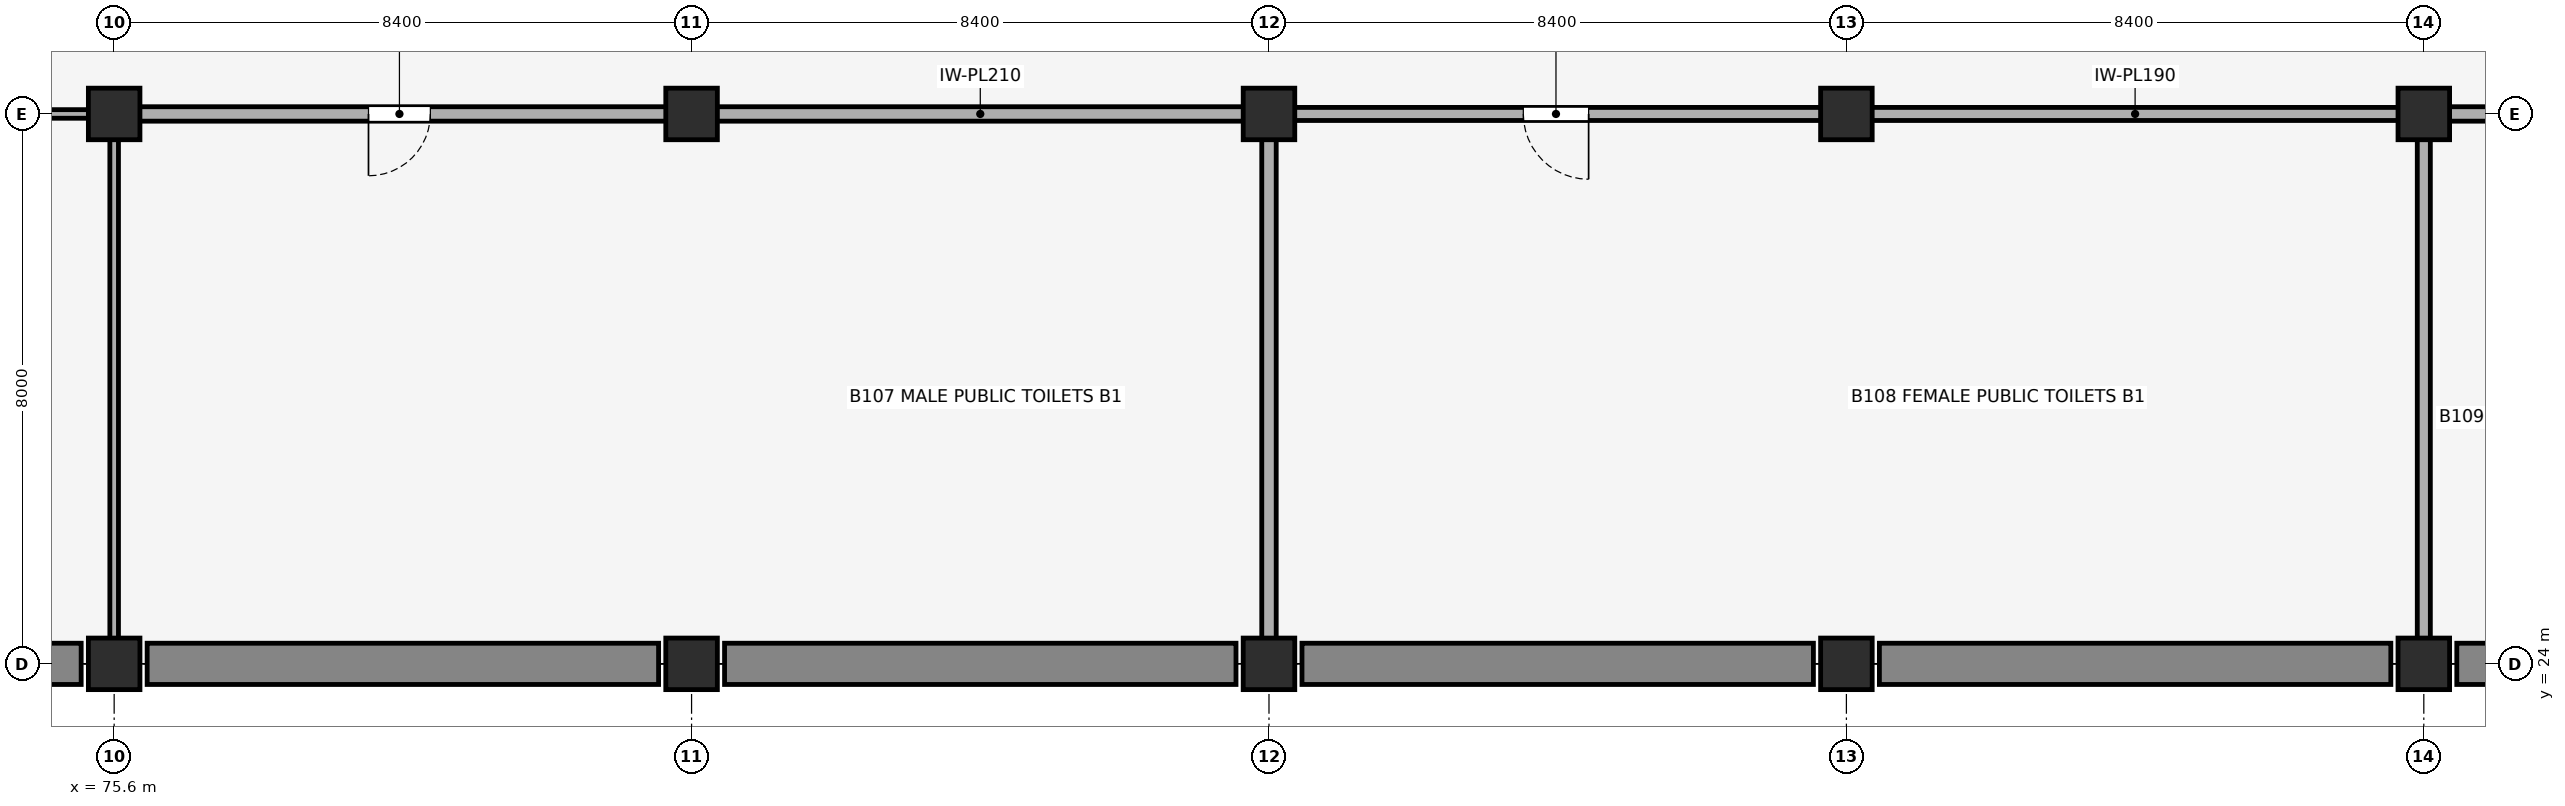
"""IFC4 building model, lengths in metres.
Left out: names, types, materials, properties, quantities, classifications, styles, units other than length and angle.
Written with IfcOpenShell. Run it as: python <this file> out.ifc"""

import sys

from ifc_helpers import new_model, si_unit, direction, frame, frame_2d, origin, origin_2d, place, context, subcontext, project, spatial, rectangle, extrude, element, fill, save


model = new_model("IFC4")
c1 = context("Model", 3, precision=1e-05, world=origin(), true_north=direction((0.0, 1.0)))
c2 = subcontext(c1, "Body", "Model", "MODEL_VIEW")
j1 = project(units=[si_unit("LENGTHUNIT", "METRE"), si_unit("PLANEANGLEUNIT", "RADIAN")], contexts=[c1])
p1 = place(None, origin())
s1 = spatial("IfcSite", under=j1, at=p1, CompositionType="ELEMENT")
p2 = place(p1, origin())
s2 = spatial("IfcBuilding", under=s1, at=p2, CompositionType="ELEMENT")
p3 = place(p2, frame((0.0, 0.0, -5.44)))
s3 = spatial("IfcBuildingStorey", under=s2, at=p3, CompositionType="ELEMENT", Elevation=-5.44)
p4 = place(p3, frame((67.68, 24.0, 0.0), z_axis=(0.0, 0.0, 1.0), x_axis=(1.0, 0.0, 0.0)))
e1 = element("IfcWall", 1, at=p4, inside=s3, PredefinedType="SOLIDWALL", context=c2, shape_type="SweptSolid", body=[
    extrude(rectangle(XDim=7.44, YDim=0.6, at=frame_2d((3.72, 0.0))), origin(), (0.0, 0.0, 1.0), 5.02),
])
for number, where, z_axis, x_axis in (
    (2, (76.08, 24.0, 0.0), (0.0, 0.0, 1.0), (1.0, 0.0, 0.0)),
    (3, (84.48, 24.0, 0.0), (0.0, 0.0, 1.0), (1.0, 0.0, 0.0)),
):
    element("IfcWall", number, at=place(p3, frame(where, z_axis=z_axis, x_axis=x_axis)), inside=s3, PredefinedType="SOLIDWALL", context=c2, shape_type="SweptSolid", body=[
        extrude(rectangle(XDim=7.44, YDim=0.6, at=frame_2d((3.72, 0.0))), origin(), (0.0, 0.0, 1.0), 5.02),
    ])
p5 = place(p3, frame((92.88, 24.0, 0.0), z_axis=(0.0, 0.0, 1.0), x_axis=(1.0, 0.0, 0.0)))
e4 = element("IfcWall", 4, at=p5, inside=s3, PredefinedType="SOLIDWALL", context=c2, shape_type="SweptSolid", body=[
    extrude(rectangle(XDim=7.44, YDim=0.6, at=frame_2d((3.72, 0.0))), origin(), (0.0, 0.0, 1.0), 5.02),
])
p6 = place(p3, frame((101.28, 24.0, 0.0), z_axis=(0.0, 0.0, 1.0), x_axis=(1.0, 0.0, 0.0)))
e5 = element("IfcWall", 5, at=p6, inside=s3, PredefinedType="SOLIDWALL", context=c2, shape_type="SweptSolid", body=[
    extrude(rectangle(XDim=7.44, YDim=0.6, at=frame_2d((3.72, 0.0))), origin(), (0.0, 0.0, 1.0), 5.02),
])
p7 = place(p3, frame((109.68, 24.0, 0.0), z_axis=(0.0, 0.0, 1.0), x_axis=(1.0, 0.0, 0.0)))
e6 = element("IfcWall", 6, at=p7, inside=s3, PredefinedType="SOLIDWALL", context=c2, shape_type="SweptSolid", body=[
    extrude(rectangle(XDim=7.44, YDim=0.6, at=frame_2d((3.72, 0.0))), origin(), (0.0, 0.0, 1.0), 5.02),
])
for number, where, z_axis, x_axis in (
    (7, (75.6, 24.0, 0.0), (0.0, 0.0, 1.0), (1.0, 0.0, 0.0)),
    (8, (75.6, 32.0, 0.0), (0.0, 0.0, 1.0), (1.0, 0.0, 0.0)),
    (9, (84.0, 24.0, 0.0), (0.0, 0.0, 1.0), (1.0, 0.0, 0.0)),
    (10, (84.0, 32.0, 0.0), (0.0, 0.0, 1.0), (1.0, 0.0, 0.0)),
    (11, (92.4, 24.0, 0.0), (0.0, 0.0, 1.0), (1.0, 0.0, 0.0)),
    (12, (92.4, 32.0, 0.0), (0.0, 0.0, 1.0), (1.0, 0.0, 0.0)),
    (13, (100.8, 24.0, 0.0), (0.0, 0.0, 1.0), (1.0, 0.0, 0.0)),
    (14, (100.8, 32.0, 0.0), (0.0, 0.0, 1.0), (1.0, 0.0, 0.0)),
    (15, (109.2, 24.0, 0.0), (0.0, 0.0, 1.0), (1.0, 0.0, 0.0)),
    (16, (109.2, 32.0, 0.0), (0.0, 0.0, 1.0), (1.0, 0.0, 0.0)),
):
    element("IfcColumn", number, at=place(p3, frame(where, z_axis=z_axis, x_axis=x_axis)), inside=s3, PredefinedType="COLUMN", context=c2, shape_type="SweptSolid", body=[
        extrude(rectangle(XDim=0.75, YDim=0.75, at=origin_2d()), origin(), (0.0, 0.0, 1.0), 5.02),
    ])
p8 = place(p3, frame((75.965, 32.0, 0.0), z_axis=(0.0, 0.0, 1.0), x_axis=(1.0, 0.0, 0.0)))
e17 = element("IfcWall", 17, at=p8, inside=s3, PredefinedType="PLUMBINGWALL", context=c2, shape_type="SweptSolid", body=[
    extrude(rectangle(XDim=7.67, YDim=0.21, at=frame_2d((3.835, 0.0))), origin(), (0.0, 0.0, 1.0), 4.07),
])
p9 = place(p8, frame((4.235, 0.0, 0.0), z_axis=(0.0, 0.0, 1.0), x_axis=(-1.0, 0.0, 0.0)))
e18 = element("IfcOpeningElement", 18, at=p9, cuts=e17, PredefinedType="OPENING", context=c2, shape_type="SweptSolid", body=[
    extrude(rectangle(XDim=0.9, YDim=2.15, at=frame_2d((0.45, 1.075))), frame((0.0, 0.115, 0.0), z_axis=(0.0, -1.0, 0.0), x_axis=(1.0, 0.0, 0.0)), (0.0, 0.0, 1.0), 0.23),
])
p10 = place(p3, frame((92.765, 32.0, 0.0), z_axis=(0.0, 0.0, 1.0), x_axis=(1.0, 0.0, 0.0)))
e19 = element("IfcWall", 19, at=p10, inside=s3, PredefinedType="PLUMBINGWALL", context=c2, shape_type="SweptSolid", body=[
    extrude(rectangle(XDim=7.67, YDim=0.19, at=frame_2d((3.835, 0.0))), origin(), (0.0, 0.0, 1.0), 4.07),
])
p11 = place(p10, frame((4.285, 0.0, 0.0), z_axis=(0.0, 0.0, 1.0), x_axis=(-1.0, 0.0, 0.0)))
e20 = element("IfcOpeningElement", 20, at=p11, cuts=e19, PredefinedType="OPENING", context=c2, shape_type="SweptSolid", body=[
    extrude(rectangle(XDim=0.95, YDim=2.15, at=frame_2d((0.475, 1.075))), frame((0.0, 0.105, 0.0), z_axis=(0.0, -1.0, 0.0), x_axis=(1.0, 0.0, 0.0)), (0.0, 0.0, 1.0), 0.21),
])
p12 = place(p3, frame((109.565, 32.0, 0.0), z_axis=(0.0, 0.0, 1.0), x_axis=(1.0, 0.0, 0.0)))
e21 = element("IfcWall", 21, at=p12, inside=s3, PredefinedType="PLUMBINGWALL", context=c2, shape_type="SweptSolid", body=[
    extrude(rectangle(XDim=7.67, YDim=0.21, at=frame_2d((3.835, 0.0))), origin(), (0.0, 0.0, 1.0), 4.07),
])
p13 = place(p12, frame((4.235, 0.0, 0.0), z_axis=(0.0, 0.0, 1.0), x_axis=(-1.0, 0.0, 0.0)))
e22 = element("IfcOpeningElement", 22, at=p13, cuts=e21, PredefinedType="OPENING", context=c2, shape_type="SweptSolid", body=[
    extrude(rectangle(XDim=0.9, YDim=2.15, at=frame_2d((0.45, 1.075))), frame((0.0, 0.115, 0.0), z_axis=(0.0, -1.0, 0.0), x_axis=(1.0, 0.0, 0.0)), (0.0, 0.0, 1.0), 0.23),
])
p14 = place(p3, frame((67.565, 32.0, 0.0), z_axis=(0.0, 0.0, 1.0), x_axis=(1.0, 0.0, 0.0)))
e23 = element("IfcWall", 23, at=p14, inside=s3, PredefinedType="PARTITIONING", context=c2, shape_type="SweptSolid", body=[
    extrude(rectangle(XDim=7.67, YDim=0.125, at=frame_2d((3.835, 0.0))), origin(), (0.0, 0.0, 1.0), 4.07),
])
p15 = place(p3, frame((75.6, 24.365, 0.0), z_axis=(0.0, 0.0, 1.0), x_axis=(0.0, 1.0, 0.0)))
e24 = element("IfcWall", 24, at=p15, inside=s3, PredefinedType="PARTITIONING", context=c2, shape_type="SweptSolid", body=[
    extrude(rectangle(XDim=7.27, YDim=0.125, at=frame_2d((3.635, 0.0))), origin(), (0.0, 0.0, 1.0), 4.37),
])
p16 = place(p3, frame((84.365, 32.0, 0.0), z_axis=(0.0, 0.0, 1.0), x_axis=(1.0, 0.0, 0.0)))
e25 = element("IfcWall", 25, at=p16, inside=s3, PredefinedType="PLUMBINGWALL", context=c2, shape_type="SweptSolid", body=[
    extrude(rectangle(XDim=7.67, YDim=0.21, at=frame_2d((3.835, 0.0))), origin(), (0.0, 0.0, 1.0), 4.07),
])
p17 = place(p3, frame((92.4, 24.365, 0.0), z_axis=(0.0, 0.0, 1.0), x_axis=(0.0, 1.0, 0.0)))
e26 = element("IfcWall", 26, at=p17, inside=s3, PredefinedType="PLUMBINGWALL", context=c2, shape_type="SweptSolid", body=[
    extrude(rectangle(XDim=7.27, YDim=0.21, at=frame_2d((3.635, 0.0))), origin(), (0.0, 0.0, 1.0), 4.37),
])
p18 = place(p3, frame((101.165, 32.0, 0.0), z_axis=(0.0, 0.0, 1.0), x_axis=(1.0, 0.0, 0.0)))
e27 = element("IfcWall", 27, at=p18, inside=s3, PredefinedType="PLUMBINGWALL", context=c2, shape_type="SweptSolid", body=[
    extrude(rectangle(XDim=7.67, YDim=0.19, at=frame_2d((3.835, 0.0))), origin(), (0.0, 0.0, 1.0), 4.07),
])
p19 = place(p3, frame((109.2, 24.365, 0.0), z_axis=(0.0, 0.0, 1.0), x_axis=(0.0, 1.0, 0.0)))
e28 = element("IfcWall", 28, at=p19, inside=s3, PredefinedType="PLUMBINGWALL", context=c2, shape_type="SweptSolid", body=[
    extrude(rectangle(XDim=7.27, YDim=0.19, at=frame_2d((3.635, 0.0))), origin(), (0.0, 0.0, 1.0), 4.37),
])
p20 = place(p9, origin())
e29 = element("IfcDoor", 29, at=p20, inside=s3, OperationType="SINGLE_SWING_RIGHT", PredefinedType="DOOR", context=c2, shape_type="SweptSolid", body=[
    extrude(rectangle(XDim=0.9, YDim=2.15, at=frame_2d((0.45, 1.075))), frame((0.0, 0.025, 0.0), z_axis=(0.0, -1.0, 0.0), x_axis=(1.0, 0.0, 0.0)), (0.0, 0.0, 1.0), 0.05),
])
fill(e18, e29)
p21 = place(p11, origin())
e30 = element("IfcDoor", 30, at=p21, inside=s3, OperationType="SINGLE_SWING_LEFT", PredefinedType="DOOR", context=c2, shape_type="SweptSolid", body=[
    extrude(rectangle(XDim=0.95, YDim=2.15, at=frame_2d((0.475, 1.075))), frame((0.0, 0.025, 0.0), z_axis=(0.0, -1.0, 0.0), x_axis=(1.0, 0.0, 0.0)), (0.0, 0.0, 1.0), 0.05),
])
fill(e20, e30)
save(model, sys.argv[1])
